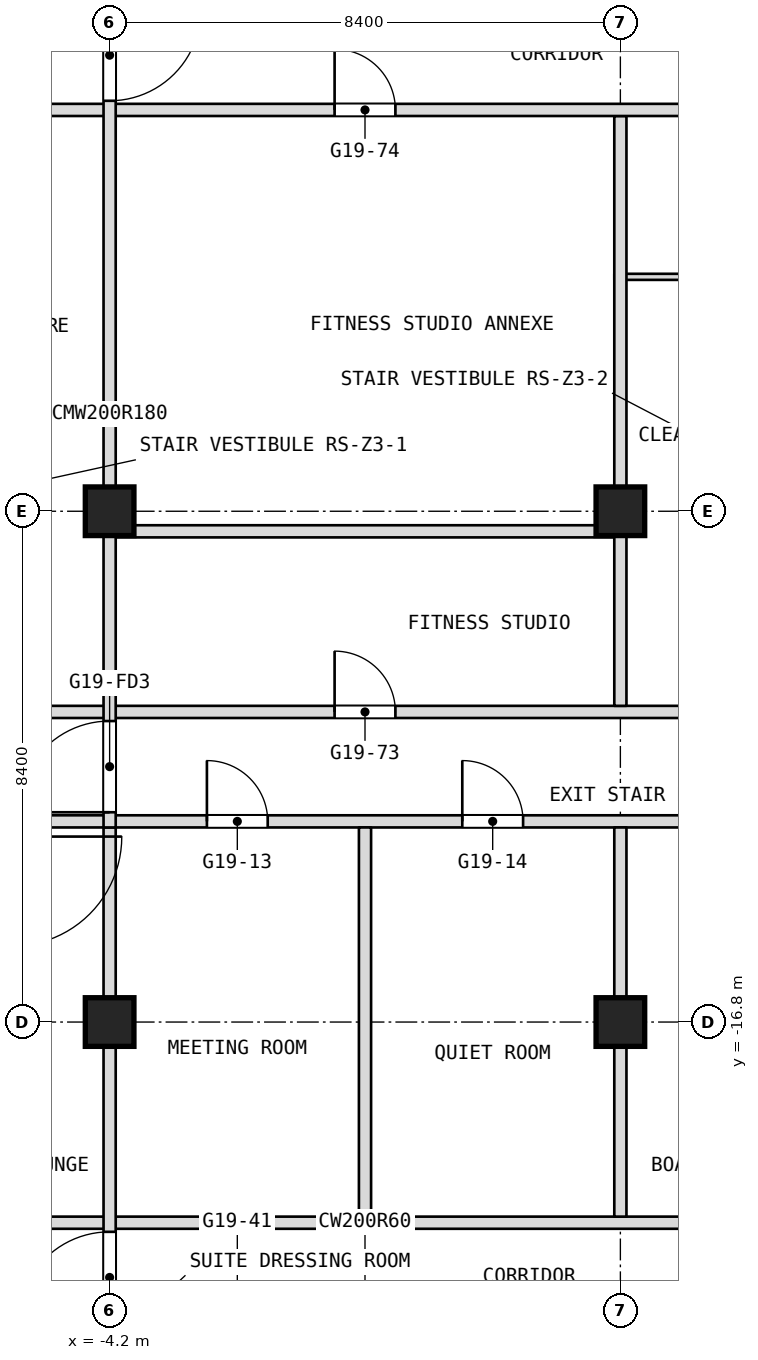
"""IFC4 building model, lengths in metres.
Left out: names, types, materials, properties, quantities, classifications, styles, units other than length and angle.
Written with IfcOpenShell. Run it as: python <this file> out.ifc"""

import sys

from ifc_helpers import new_model, si_unit, direction, frame, frame_2d, origin, origin_2d, place, context, subcontext, project, spatial, rectangle, extrude, element, fill, save


model = new_model("IFC4")
c1 = context("Model", 3, precision=1e-05, world=origin(), true_north=direction((0.0, 1.0)))
c2 = subcontext(c1, "Body", "Model", "MODEL_VIEW")
j1 = project(units=[si_unit("LENGTHUNIT", "METRE"), si_unit("PLANEANGLEUNIT", "RADIAN")], contexts=[c1])
p1 = place(None, origin())
s1 = spatial("IfcSite", under=j1, at=p1, CompositionType="ELEMENT")
p2 = place(p1, origin())
s2 = spatial("IfcBuilding", under=s1, at=p2, CompositionType="ELEMENT")
p3 = place(p2, frame((0.0, 0.0, 227.3)))
s3 = spatial("IfcBuildingStorey", under=s2, at=p3, CompositionType="ELEMENT", Elevation=227.3)
for number, where, z_axis, x_axis in (
    (1, (-4.2, -16.8, 0.0), (0.0, 0.0, 1.0), (1.0, 0.0, 0.0)),
    (2, (-4.2, -8.4, 0.0), (0.0, 0.0, 1.0), (1.0, 0.0, 0.0)),
    (3, (4.2, -16.8, 0.0), (0.0, 0.0, 1.0), (1.0, 0.0, 0.0)),
    (4, (4.2, -8.4, 0.0), (0.0, 0.0, 1.0), (1.0, 0.0, 0.0)),
):
    element("IfcColumn", number, at=place(p3, frame(where, z_axis=z_axis, x_axis=x_axis)), inside=s3, PredefinedType="COLUMN", context=c2, shape_type="SweptSolid", body=[
        extrude(rectangle(XDim=0.8, YDim=0.8, at=origin_2d()), origin(), (0.0, 0.0, 1.0), 3.6),
    ])
p4 = place(p3, frame((-16.7, -20.1, 0.0), z_axis=(0.0, 0.0, 1.0), x_axis=(1.0, 0.0, 0.0)))
e5 = element("IfcWall", 5, at=p4, inside=s3, PredefinedType="PARTITIONING", context=c2, shape_type="SweptSolid", body=[
    extrude(rectangle(XDim=33.4, YDim=0.2, at=frame_2d((16.7, 0.0))), origin(), (0.0, 0.0, 1.0), 3.34),
])
p5 = place(p3, frame((-5.9, -13.5, 0.0), z_axis=(0.0, 0.0, 1.0), x_axis=(1.0, 0.0, 0.0)))
e6 = element("IfcWall", 6, at=p5, inside=s3, PredefinedType="PARTITIONING", context=c2, shape_type="SweptSolid", body=[
    extrude(rectangle(XDim=11.6, YDim=0.2, at=frame_2d((5.8, 0.0))), origin(), (0.0, 0.0, 1.0), 3.34),
])
p6 = place(p5, frame((3.3, 0.0, 0.0)))
e7 = element("IfcOpeningElement", 7, at=p6, cuts=e6, PredefinedType="OPENING", context=c2, shape_type="SweptSolid", body=[
    extrude(rectangle(XDim=1.0, YDim=2.1, at=frame_2d((0.5, 1.05))), frame((0.0, 0.1, 0.0), z_axis=(0.0, -1.0, 0.0), x_axis=(1.0, 0.0, 0.0)), (0.0, 0.0, 1.0), 0.2),
])
p7 = place(p5, frame((7.5, 0.0, 0.0)))
e8 = element("IfcOpeningElement", 8, at=p7, cuts=e6, PredefinedType="OPENING", context=c2, shape_type="SweptSolid", body=[
    extrude(rectangle(XDim=1.0, YDim=2.1, at=frame_2d((0.5, 1.05))), frame((0.0, 0.1, 0.0), z_axis=(0.0, -1.0, 0.0), x_axis=(1.0, 0.0, 0.0)), (0.0, 0.0, 1.0), 0.2),
])
p8 = place(p3, frame((-7.3, -11.7, 0.0), z_axis=(0.0, 0.0, 1.0), x_axis=(1.0, 0.0, 0.0)))
e9 = element("IfcWall", 9, at=p8, inside=s3, PredefinedType="PARTITIONING", context=c2, shape_type="SweptSolid", body=[
    extrude(rectangle(XDim=14.6, YDim=0.2, at=frame_2d((7.3, 0.0))), origin(), (0.0, 0.0, 1.0), 3.34),
])
p9 = place(p8, frame((6.8, 0.0, 0.0)))
e10 = element("IfcOpeningElement", 10, at=p9, cuts=e9, PredefinedType="OPENING", context=c2, shape_type="SweptSolid", body=[
    extrude(rectangle(XDim=1.0, YDim=2.1, at=frame_2d((0.5, 1.05))), frame((0.0, 0.1, 0.0), z_axis=(0.0, -1.0, 0.0), x_axis=(1.0, 0.0, 0.0)), (0.0, 0.0, 1.0), 0.2),
])
p10 = place(p3, frame((-4.1, -8.73, 0.0), z_axis=(0.0, 0.0, 1.0), x_axis=(1.0, 0.0, 0.0)))
e11 = element("IfcWall", 11, at=p10, inside=s3, PredefinedType="PARTITIONING", context=c2, shape_type="SweptSolid", body=[
    extrude(rectangle(XDim=8.2, YDim=0.2, at=frame_2d((4.1, 0.0))), origin(), (0.0, 0.0, 1.0), 3.34),
])
p11 = place(p3, frame((4.1, -4.545, 0.0), z_axis=(0.0, 0.0, 1.0), x_axis=(1.0, 0.0, 0.0)))
e12 = element("IfcWall", 12, at=p11, inside=s3, PredefinedType="PARTITIONING", context=c2, shape_type="SweptSolid", body=[
    extrude(rectangle(XDim=4.4, YDim=0.1, at=frame_2d((2.2, 0.0))), origin(), (0.0, 0.0, 1.0), 3.34),
])
p12 = place(p11, frame((1.75, 0.0, 0.0)))
e13 = element("IfcOpeningElement", 13, at=p12, cuts=e12, PredefinedType="OPENING", context=c2, shape_type="SweptSolid", body=[
    extrude(rectangle(XDim=0.9, YDim=2.1, at=frame_2d((0.45, 1.05))), frame((0.0, 0.05, 0.0), z_axis=(0.0, -1.0, 0.0), x_axis=(1.0, 0.0, 0.0)), (0.0, 0.0, 1.0), 0.1),
])
p13 = place(p3, frame((4.2, -20.0, 0.0), z_axis=(0.0, 0.0, 1.0), x_axis=(0.0, 1.0, 0.0)))
e14 = element("IfcWall", 14, at=p13, inside=s3, PredefinedType="PARTITIONING", context=c2, shape_type="SweptSolid", body=[
    extrude(rectangle(XDim=6.4, YDim=0.2, at=frame_2d((3.2, 0.0))), origin(), (0.0, 0.0, 1.0), 3.34),
])
p14 = place(p3, frame((4.2, -11.6, 0.0), z_axis=(0.0, 0.0, 1.0), x_axis=(0.0, 1.0, 0.0)))
e15 = element("IfcWall", 15, at=p14, inside=s3, PredefinedType="PARTITIONING", context=c2, shape_type="SweptSolid", body=[
    extrude(rectangle(XDim=9.7, YDim=0.2, at=frame_2d((4.85, 0.0))), origin(), (0.0, 0.0, 1.0), 3.34),
])
p15 = place(p3, frame((-16.9, -1.8, 0.0), z_axis=(0.0, 0.0, 1.0), x_axis=(1.0, 0.0, 0.0)))
e16 = element("IfcWall", 16, at=p15, inside=s3, PredefinedType="PARTITIONING", context=c2, shape_type="SweptSolid", body=[
    extrude(rectangle(XDim=33.8, YDim=0.2, at=frame_2d((16.9, 0.0))), origin(), (0.0, 0.0, 1.0), 3.34),
])
p16 = place(p15, frame((1.7, 0.0, 0.0)))
e17 = element("IfcOpeningElement", 17, at=p16, cuts=e16, PredefinedType="OPENING", context=c2, shape_type="SweptSolid", body=[
    extrude(rectangle(XDim=1.0, YDim=2.1, at=frame_2d((0.5, 1.05))), frame((0.0, 0.1, 0.0), z_axis=(0.0, -1.0, 0.0), x_axis=(1.0, 0.0, 0.0)), (0.0, 0.0, 1.0), 0.2),
])
p17 = place(p15, frame((5.9, 0.0, 0.0)))
e18 = element("IfcOpeningElement", 18, at=p17, cuts=e16, PredefinedType="OPENING", context=c2, shape_type="SweptSolid", body=[
    extrude(rectangle(XDim=1.0, YDim=2.1, at=frame_2d((0.5, 1.05))), frame((0.0, 0.1, 0.0), z_axis=(0.0, -1.0, 0.0), x_axis=(1.0, 0.0, 0.0)), (0.0, 0.0, 1.0), 0.2),
])
p18 = place(p15, frame((10.1, 0.0, 0.0)))
e19 = element("IfcOpeningElement", 19, at=p18, cuts=e16, PredefinedType="OPENING", context=c2, shape_type="SweptSolid", body=[
    extrude(rectangle(XDim=1.0, YDim=2.1, at=frame_2d((0.5, 1.05))), frame((0.0, 0.1, 0.0), z_axis=(0.0, -1.0, 0.0), x_axis=(1.0, 0.0, 0.0)), (0.0, 0.0, 1.0), 0.2),
])
p19 = place(p15, frame((22.7, 0.0, 0.0)))
e20 = element("IfcOpeningElement", 20, at=p19, cuts=e16, PredefinedType="OPENING", context=c2, shape_type="SweptSolid", body=[
    extrude(rectangle(XDim=1.0, YDim=2.1, at=frame_2d((0.5, 1.05))), frame((0.0, 0.1, 0.0), z_axis=(0.0, -1.0, 0.0), x_axis=(1.0, 0.0, 0.0)), (0.0, 0.0, 1.0), 0.2),
])
p20 = place(p15, frame((26.9, 0.0, 0.0)))
e21 = element("IfcOpeningElement", 21, at=p20, cuts=e16, PredefinedType="OPENING", context=c2, shape_type="SweptSolid", body=[
    extrude(rectangle(XDim=1.0, YDim=2.1, at=frame_2d((0.5, 1.05))), frame((0.0, 0.1, 0.0), z_axis=(0.0, -1.0, 0.0), x_axis=(1.0, 0.0, 0.0)), (0.0, 0.0, 1.0), 0.2),
])
p21 = place(p15, frame((31.1, 0.0, 0.0)))
e22 = element("IfcOpeningElement", 22, at=p21, cuts=e16, PredefinedType="OPENING", context=c2, shape_type="SweptSolid", body=[
    extrude(rectangle(XDim=1.0, YDim=2.1, at=frame_2d((0.5, 1.05))), frame((0.0, 0.1, 0.0), z_axis=(0.0, -1.0, 0.0), x_axis=(1.0, 0.0, 0.0)), (0.0, 0.0, 1.0), 0.2),
])
p22 = place(p15, frame((16.4, 0.0, 0.0)))
e23 = element("IfcOpeningElement", 23, at=p22, cuts=e16, PredefinedType="OPENING", context=c2, shape_type="SweptSolid", body=[
    extrude(rectangle(XDim=1.0, YDim=2.1, at=frame_2d((0.5, 1.05))), frame((0.0, 0.1, 0.0), z_axis=(0.0, -1.0, 0.0), x_axis=(1.0, 0.0, 0.0)), (0.0, 0.0, 1.0), 0.2),
])
p23 = place(p3, frame((0.0, -20.0, 0.0), z_axis=(0.0, 0.0, 1.0), x_axis=(0.0, 1.0, 0.0)))
e24 = element("IfcWall", 24, at=p23, inside=s3, PredefinedType="PARTITIONING", context=c2, shape_type="SweptSolid", body=[
    extrude(rectangle(XDim=6.4, YDim=0.2, at=frame_2d((3.2, 0.0))), origin(), (0.0, 0.0, 1.0), 3.34),
])
p24 = place(p3, frame((-4.2, -22.0, 0.0), z_axis=(0.0, 0.0, 1.0), x_axis=(0.0, 1.0, 0.0)))
e25 = element("IfcWall", 25, at=p24, inside=s3, PredefinedType="PARTITIONING", context=c2, shape_type="SweptSolid", body=[
    extrude(rectangle(XDim=8.4, YDim=0.2, at=frame_2d((4.2, 0.0))), origin(), (0.0, 0.0, 1.0), 3.34),
])
p25 = place(p24, frame((0.25, 0.0, 0.0)))
e26 = element("IfcOpeningElement", 26, at=p25, cuts=e25, PredefinedType="OPENING", context=c2, shape_type="SweptSolid", body=[
    extrude(rectangle(XDim=1.5, YDim=2.1, at=frame_2d((0.75, 1.05))), frame((0.0, 0.1, 0.0), z_axis=(0.0, -1.0, 0.0), x_axis=(1.0, 0.0, 0.0)), (0.0, 0.0, 1.0), 0.2),
])
p26 = place(p3, frame((-4.2, -13.6, 0.0), z_axis=(0.0, 0.0, 1.0), x_axis=(0.0, 1.0, 0.0)))
e27 = element("IfcWall", 27, at=p26, inside=s3, PredefinedType="PARTITIONING", context=c2, shape_type="SweptSolid", body=[
    extrude(rectangle(XDim=13.6, YDim=0.2, at=frame_2d((6.8, 0.0))), origin(), (0.0, 0.0, 1.0), 3.34),
])
p27 = place(p26, frame((11.95, 0.0, 0.0)))
e28 = element("IfcOpeningElement", 28, at=p27, cuts=e27, PredefinedType="OPENING", context=c2, shape_type="SweptSolid", body=[
    extrude(rectangle(XDim=1.5, YDim=2.1, at=frame_2d((0.75, 1.05))), frame((0.0, 0.1, 0.0), z_axis=(0.0, -1.0, 0.0), x_axis=(1.0, 0.0, 0.0)), (0.0, 0.0, 1.0), 0.2),
])
p28 = place(p26, frame((0.25, 0.0, 0.0)))
e29 = element("IfcOpeningElement", 29, at=p28, cuts=e27, PredefinedType="OPENING", context=c2, shape_type="SweptSolid", body=[
    extrude(rectangle(XDim=1.5, YDim=2.1, at=frame_2d((0.75, 1.05))), frame((0.0, 0.1, 0.0), z_axis=(0.0, -1.0, 0.0), x_axis=(1.0, 0.0, 0.0)), (0.0, 0.0, 1.0), 0.2),
])
p29 = place(p6, origin())
e30 = element("IfcDoor", 30, at=p29, inside=s3, OperationType="SINGLE_SWING_LEFT", PredefinedType="DOOR", context=c2, shape_type="SweptSolid", body=[
    extrude(rectangle(XDim=1.0, YDim=2.1, at=frame_2d((0.5, 1.05))), frame((0.0, 0.025, 0.0), z_axis=(0.0, -1.0, 0.0), x_axis=(1.0, 0.0, 0.0)), (0.0, 0.0, 1.0), 0.05),
])
fill(e7, e30)
p30 = place(p7, origin())
e31 = element("IfcDoor", 31, at=p30, inside=s3, OperationType="SINGLE_SWING_RIGHT", PredefinedType="DOOR", context=c2, shape_type="SweptSolid", body=[
    extrude(rectangle(XDim=1.0, YDim=2.1, at=frame_2d((0.5, 1.05))), frame((0.0, 0.025, 0.0), z_axis=(0.0, -1.0, 0.0), x_axis=(1.0, 0.0, 0.0)), (0.0, 0.0, 1.0), 0.05),
])
fill(e8, e31)
p31 = place(p9, origin())
e32 = element("IfcDoor", 32, at=p31, inside=s3, OperationType="SINGLE_SWING_LEFT", PredefinedType="DOOR", context=c2, shape_type="SweptSolid", body=[
    extrude(rectangle(XDim=1.0, YDim=2.1, at=frame_2d((0.5, 1.05))), frame((0.0, 0.025, 0.0), z_axis=(0.0, -1.0, 0.0), x_axis=(1.0, 0.0, 0.0)), (0.0, 0.0, 1.0), 0.05),
])
fill(e10, e32)
p32 = place(p22, origin())
e33 = element("IfcDoor", 33, at=p32, inside=s3, OperationType="SINGLE_SWING_LEFT", PredefinedType="DOOR", context=c2, shape_type="SweptSolid", body=[
    extrude(rectangle(XDim=1.0, YDim=2.1, at=frame_2d((0.5, 1.05))), frame((0.0, 0.025, 0.0), z_axis=(0.0, -1.0, 0.0), x_axis=(1.0, 0.0, 0.0)), (0.0, 0.0, 1.0), 0.05),
])
fill(e23, e33)
p33 = place(p27, origin())
e34 = element("IfcDoor", 34, at=p33, inside=s3, OperationType="DOUBLE_DOOR_DOUBLE_SWING", PredefinedType="DOOR", context=c2, shape_type="SweptSolid", body=[
    extrude(rectangle(XDim=1.5, YDim=2.1, at=frame_2d((0.75, 1.05))), frame((0.0, 0.025, 0.0), z_axis=(0.0, -1.0, 0.0), x_axis=(1.0, 0.0, 0.0)), (0.0, 0.0, 1.0), 0.05),
])
fill(e28, e34)
p34 = place(p28, origin())
e35 = element("IfcDoor", 35, at=p34, inside=s3, OperationType="DOUBLE_DOOR_DOUBLE_SWING", PredefinedType="DOOR", context=c2, shape_type="SweptSolid", body=[
    extrude(rectangle(XDim=1.5, YDim=2.1, at=frame_2d((0.75, 1.05))), frame((0.0, 0.025, 0.0), z_axis=(0.0, -1.0, 0.0), x_axis=(1.0, 0.0, 0.0)), (0.0, 0.0, 1.0), 0.05),
])
fill(e29, e35)
p35 = place(p25, origin())
e36 = element("IfcDoor", 36, at=p35, inside=s3, OperationType="DOUBLE_DOOR_DOUBLE_SWING", PredefinedType="DOOR", context=c2, shape_type="SweptSolid", body=[
    extrude(rectangle(XDim=1.5, YDim=2.1, at=frame_2d((0.75, 1.05))), frame((0.0, 0.025, 0.0), z_axis=(0.0, -1.0, 0.0), x_axis=(1.0, 0.0, 0.0)), (0.0, 0.0, 1.0), 0.05),
])
fill(e26, e36)
save(model, sys.argv[1])
